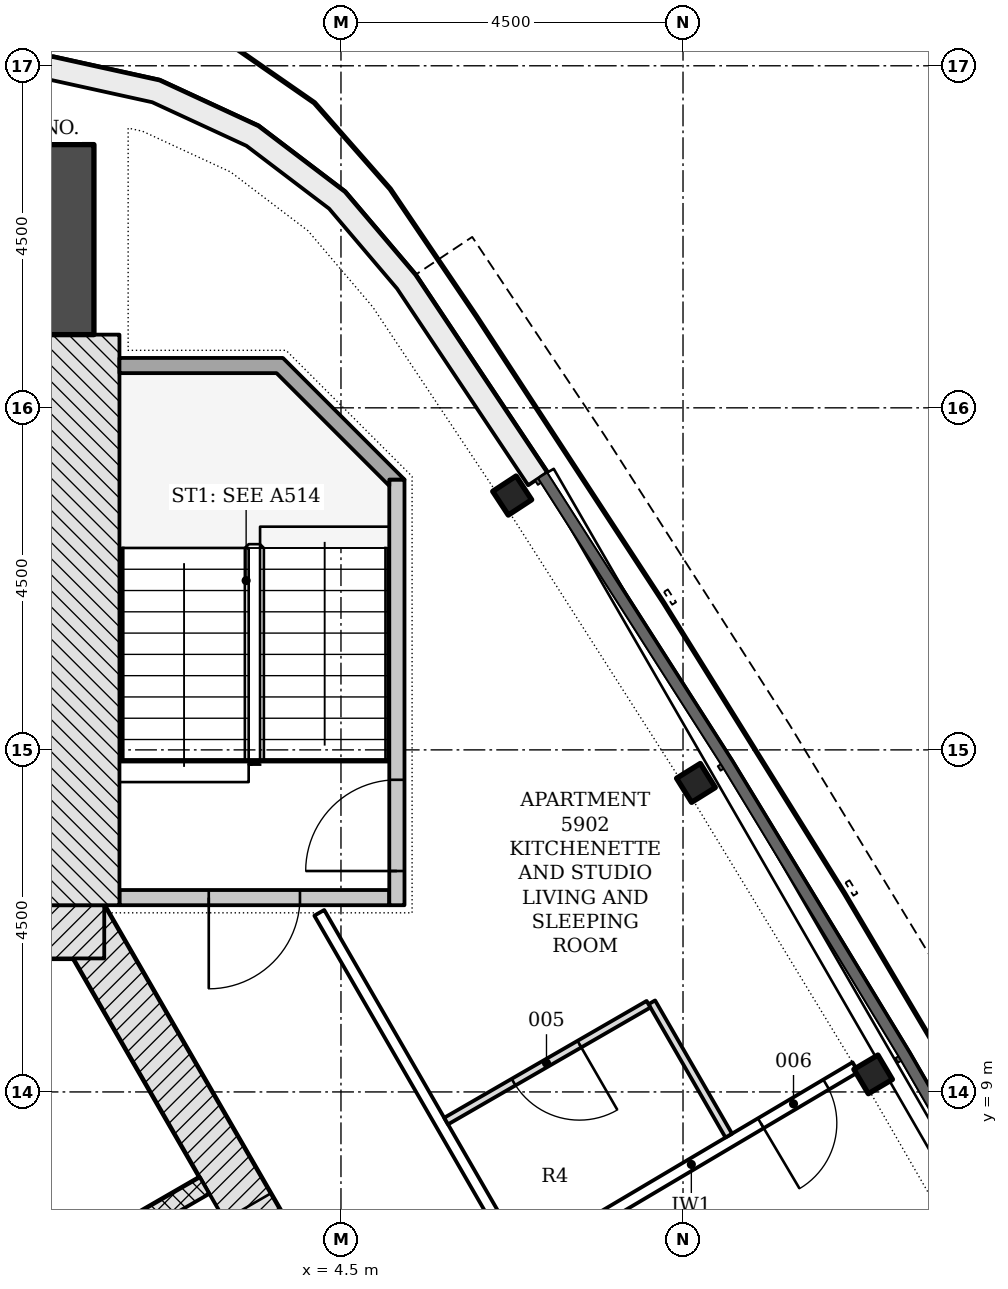
"""IFC4 building model, lengths in metres.
Left out: names, types, materials, properties, quantities, classifications, styles, units other than length and angle.
Written with IfcOpenShell. Run it as: python <this file> out.ifc"""

import sys

from ifc_helpers import new_model, si_unit, direction, frame, frame_2d, origin, origin_2d, place, context, subcontext, project, spatial, polyline, rectangle, i_section, outline, extrude, element, fill, save


model = new_model("IFC4")
c1 = context("Model", 3, precision=1e-05, world=origin(), true_north=direction((0.0, 1.0)))
c2 = subcontext(c1, "Body", "Model", "MODEL_VIEW")
j1 = project(units=[si_unit("LENGTHUNIT", "METRE"), si_unit("PLANEANGLEUNIT", "RADIAN")], contexts=[c1])
p1 = place(None, origin())
s1 = spatial("IfcSite", under=j1, at=p1, CompositionType="ELEMENT")
p2 = place(p1, origin())
s2 = spatial("IfcBuilding", under=s1, at=p2, CompositionType="ELEMENT")
p3 = place(p2, frame((0.0, 0.0, 229.2)))
s3 = spatial("IfcBuildingStorey", under=s2, at=p3, CompositionType="ELEMENT", Elevation=229.2)
p4 = place(p3, frame((10.311, -4.703, -0.2), z_axis=(0.0, 0.0, 1.0), x_axis=(-0.500001446645, 0.866024568562, 0.0)))
e1 = element("IfcWall", 1, at=p4, inside=s3, PredefinedType="SHEAR", context=c2, shape_type="SweptSolid", body=[
    extrude(rectangle(XDim=18.458, YDim=0.7, at=frame_2d((9.229, 0.0))), origin(), (0.0, 0.0, 1.0), 3.6),
])
p5 = place(p4, frame((4.379, 0.0, 0.2)))
e2 = element("IfcOpeningElement", 2, at=p5, cuts=e1, PredefinedType="OPENING", context=c2, shape_type="SweptSolid", body=[
    extrude(rectangle(XDim=1.1, YDim=2.1, at=frame_2d((0.55, 1.05))), frame((0.0, 0.36, 0.0), z_axis=(0.0, -1.0, 0.0), x_axis=(1.0, 0.0, 0.0)), (0.0, 0.0, 1.0), 0.72),
])
p6 = place(p4, frame((6.529, 0.0, 0.2)))
e3 = element("IfcOpeningElement", 3, at=p6, cuts=e1, PredefinedType="OPENING", context=c2, shape_type="SweptSolid", body=[
    extrude(rectangle(XDim=1.1, YDim=2.1, at=frame_2d((0.55, 1.05))), frame((0.0, 0.36, 0.0), z_axis=(0.0, -1.0, 0.0), x_axis=(1.0, 0.0, 0.0)), (0.0, 0.0, 1.0), 0.72),
])
p7 = place(p4, frame((8.679, 0.0, 0.2)))
e4 = element("IfcOpeningElement", 4, at=p7, cuts=e1, PredefinedType="OPENING", context=c2, shape_type="SweptSolid", body=[
    extrude(rectangle(XDim=1.1, YDim=2.1, at=frame_2d((0.55, 1.05))), frame((0.0, 0.36, 0.0), z_axis=(0.0, -1.0, 0.0), x_axis=(1.0, 0.0, 0.0)), (0.0, 0.0, 1.0), 0.72),
])
p8 = place(p4, frame((10.829, 0.0, 0.2)))
e5 = element("IfcOpeningElement", 5, at=p8, cuts=e1, PredefinedType="OPENING", context=c2, shape_type="SweptSolid", body=[
    extrude(rectangle(XDim=1.1, YDim=2.1, at=frame_2d((0.55, 1.05))), frame((0.0, 0.36, 0.0), z_axis=(0.0, -1.0, 0.0), x_axis=(1.0, 0.0, 0.0)), (0.0, 0.0, 1.0), 0.72),
])
p9 = place(p4, frame((12.979, 0.0, 0.2)))
e6 = element("IfcOpeningElement", 6, at=p9, cuts=e1, PredefinedType="OPENING", context=c2, shape_type="SweptSolid", body=[
    extrude(rectangle(XDim=1.1, YDim=2.1, at=frame_2d((0.55, 1.05))), frame((0.0, 0.36, 0.0), z_axis=(0.0, -1.0, 0.0), x_axis=(1.0, 0.0, 0.0)), (0.0, 0.0, 1.0), 0.72),
])
p10 = place(p3, frame((1.386, 11.106, -0.2), z_axis=(0.0, 0.0, 1.0), x_axis=(-1.0, 0.0, 0.0)))
e7 = element("IfcWall", 7, at=p10, inside=s3, PredefinedType="SHEAR", context=c2, shape_type="SweptSolid", body=[
    extrude(rectangle(XDim=2.771, YDim=0.7, at=frame_2d((1.386, 0.0))), origin(), (0.0, 0.0, 1.0), 3.6),
])
p11 = place(p3, frame((0.0, 20.213, -0.2), z_axis=(0.0, 0.0, 1.0), x_axis=(0.0, 1.0, 0.0)))
e8 = element("IfcColumn", 8, at=p11, inside=s3, PredefinedType="COLUMN", context=c2, shape_type="SweptSolid", body=[
    extrude(rectangle(XDim=2.5, YDim=2.5, at=origin_2d()), origin(), (0.0, 0.0, 1.0), 3.6),
])
for number, where, z_axis, x_axis in (
    (9, (11.501, 9.231, -0.2), (0.0, 0.0, 1.0), (-0.51, 0.86, 0.0)),
    (10, (9.17, 13.065, -0.2), (0.0, 0.0, 1.0), (-0.529, 0.849, 0.0)),
    (11, (6.753, 16.846, -0.2), (0.0, 0.0, 1.0), (-0.548, 0.836, 0.0)),
):
    element("IfcColumn", number, at=place(p3, frame(where, z_axis=z_axis, x_axis=x_axis)), inside=s3, PredefinedType="COLUMN", context=c2, shape_type="SweptSolid", body=[
        extrude(i_section(OverallWidth=0.373, OverallDepth=0.368, WebThickness=0.015, FlangeThickness=0.024, FilletRadius=0.015, at=origin_2d()), origin(), (0.0, 0.0, 1.0), 3.6),
    ])
p12 = place(p3, origin())
e12 = element("IfcWall", 12, at=p12, inside=s3, PredefinedType="NOTDEFINED", context=c2, shape_type="SweptSolid", body=[
    extrude(outline(polyline([(7.213, 17.148), (5.478, 19.749), (4.551, 20.84), (3.412, 21.706), (2.113, 22.306), (0.716, 22.614), (-0.716, 22.614), (-2.113, 22.306), (-3.412, 21.706), (-4.551, 20.84), (-5.478, 19.749), (-7.213, 17.148), (-6.963, 16.981), (-5.238, 19.568), (-4.344, 20.621), (-3.256, 21.447), (-2.017, 22.021), (-0.683, 22.314), (0.683, 22.314), (2.017, 22.021), (3.256, 21.447), (4.344, 20.621), (5.238, 19.568), (6.963, 16.981), (7.213, 17.148)])), origin(), (0.0, 0.0, 1.0), 3.3),
])
p13 = place(p3, frame((2.706, 7.769, -0.2), z_axis=(0.0, 0.0, 1.0), x_axis=(-0.866022959057, -0.500004234368, 0.0)))
e13 = element("IfcWall", 13, at=p13, inside=s3, PredefinedType="PARTITIONING", context=c2, shape_type="SweptSolid", body=[
    extrude(rectangle(XDim=2.5, YDim=0.25, at=frame_2d((1.25, 0.0))), origin(), (0.0, 0.0, 1.0), 3.6),
])
p14 = place(p3, frame((5.135, 11.556, -0.2), z_axis=(0.0, 0.0, 1.0), x_axis=(-1.0, 0.0, 0.0)))
e14 = element("IfcWall", 14, at=p14, inside=s3, PredefinedType="SHEAR", context=c2, shape_type="SweptSolid", body=[
    extrude(rectangle(XDim=3.55, YDim=0.2, at=frame_2d((1.775, 0.0))), origin(), (0.0, 0.0, 1.0), 3.6),
])
p15 = place(p14, frame((1.175, 0.0, 0.2)))
e15 = element("IfcOpeningElement", 15, at=p15, cuts=e14, PredefinedType="OPENING", context=c2, shape_type="SweptSolid", body=[
    extrude(rectangle(XDim=1.2, YDim=2.1, at=frame_2d((0.6, 1.05))), frame((0.0, 0.11, 0.0), z_axis=(0.0, -1.0, 0.0), x_axis=(1.0, 0.0, 0.0)), (0.0, 0.0, 1.0), 0.22),
])
p16 = place(p3, frame((5.236, 11.456, -0.2), z_axis=(0.0, 0.0, 1.0), x_axis=(0.0, 1.0, 0.0)))
e16 = element("IfcWall", 16, at=p16, inside=s3, PredefinedType="SHEAR", context=c2, shape_type="SweptSolid", body=[
    extrude(rectangle(XDim=5.6, YDim=0.2, at=frame_2d((2.8, 0.0))), origin(), (0.0, 0.0, 1.0), 3.6),
])
p17 = place(p16, frame((0.45, 0.0, 0.2)))
e17 = element("IfcOpeningElement", 17, at=p17, cuts=e16, PredefinedType="OPENING", context=c2, shape_type="SweptSolid", body=[
    extrude(rectangle(XDim=1.2, YDim=2.1, at=frame_2d((0.6, 1.05))), frame((0.0, 0.11, 0.0), z_axis=(0.0, -1.0, 0.0), x_axis=(1.0, 0.0, 0.0)), (0.0, 0.0, 1.0), 0.22),
])
p18 = place(p3, frame((0.955, 11.456, -0.2), z_axis=(0.0, 0.0, 1.0), x_axis=(0.0, 1.0, 0.0)))
e18 = element("IfcWall", 18, at=p18, inside=s3, PredefinedType="SHEAR", context=c2, shape_type="SweptSolid", body=[
    extrude(rectangle(XDim=7.507, YDim=1.261, at=frame_2d((3.753, 0.0))), origin(), (0.0, 0.0, 1.0), 3.6),
])
p19 = place(p3, frame((0.0, 0.0, -0.2)))
e19 = element("IfcWall", 19, at=p19, inside=s3, PredefinedType="SHEAR", context=c2, shape_type="SweptSolid", body=[
    extrude(outline(polyline([(5.336, 17.056), (3.736, 18.656), (1.586, 18.656), (1.586, 18.456), (3.653, 18.456), (5.135, 16.974), (5.135, 17.056), (5.135, 17.056), (5.135, 17.056), (5.135, 17.056), (5.135, 17.056), (5.135, 17.056), (5.135, 17.056), (5.135, 17.056), (5.135, 17.056), (5.135, 17.056), (5.135, 17.056), (5.135, 17.056), (5.135, 17.056), (5.135, 17.056), (5.135, 17.056), (5.135, 17.056), (5.135, 17.056), (5.336, 17.056)])), origin(), (0.0, 0.0, 1.0), 3.6),
])
p20 = place(p3, frame((6.886, 6.729, 0.0), z_axis=(0.0, 0.0, 1.0), x_axis=(-0.4999966759, 0.866027322946, 0.0)))
e20 = element("IfcWall", 20, at=p20, inside=s3, PredefinedType="PARTITIONING", context=c2, shape_type="SweptSolid", body=[
    extrude(rectangle(XDim=5.343, YDim=0.15, at=frame_2d((2.672, 0.0))), origin(), (0.0, 0.0, 1.0), 2.852),
])
p21 = place(p3, frame((11.268, 9.325, 0.0), z_axis=(0.0, 0.0, 1.0), x_axis=(-0.860287582295, -0.509809058128, 0.0)))
e21 = element("IfcWall", 21, at=p21, inside=s3, PredefinedType="PARTITIONING", context=c2, shape_type="SweptSolid", body=[
    extrude(rectangle(XDim=5.018, YDim=0.15, at=frame_2d((2.509, 0.0))), origin(), (0.0, 0.0, 1.0), 3.4),
])
p22 = place(p21, frame((0.447, 0.0, 0.0)))
e22 = element("IfcOpeningElement", 22, at=p22, cuts=e21, PredefinedType="OPENING", context=c2, shape_type="SweptSolid", body=[
    extrude(rectangle(XDim=1.0, YDim=2.1, at=frame_2d((0.5, 1.05))), frame((0.0, 0.085, 0.0), z_axis=(0.0, -1.0, 0.0), x_axis=(1.0, 0.0, 0.0)), (0.0, 0.0, 1.0), 0.17),
])
p23 = place(p3, frame((9.602, 8.425, 0.0), z_axis=(0.0, 0.0, 1.0), x_axis=(-0.500080744026, 0.86597878118, 0.0)))
e23 = element("IfcWall", 23, at=p23, inside=s3, PredefinedType="PARTITIONING", context=c2, shape_type="SweptSolid", body=[
    extrude(rectangle(XDim=2.025, YDim=0.1, at=frame_2d((1.013, 0.0))), origin(), (0.0, 0.0, 1.0), 3.4),
])
p24 = place(p3, frame((8.546, 10.154, 0.0), z_axis=(0.0, 0.0, 1.0), x_axis=(-0.866016353143, -0.500015675843, 0.0)))
e24 = element("IfcWall", 24, at=p24, inside=s3, PredefinedType="PARTITIONING", context=c2, shape_type="SweptSolid", body=[
    extrude(rectangle(XDim=3.075, YDim=0.1, at=frame_2d((1.538, 0.0))), origin(), (0.0, 0.0, 1.0), 3.4),
])
p25 = place(p24, frame((1.05, 0.0, 0.0)))
e25 = element("IfcOpeningElement", 25, at=p25, cuts=e24, PredefinedType="OPENING", context=c2, shape_type="SweptSolid", body=[
    extrude(rectangle(XDim=1.0, YDim=2.1, at=frame_2d((0.5, 1.05))), frame((0.0, 0.06, 0.0), z_axis=(0.0, -1.0, 0.0), x_axis=(1.0, 0.0, 0.0)), (0.0, 0.0, 1.0), 0.12),
])
p26 = place(p9, origin())
e26 = element("IfcDoor", 26, at=p26, inside=s3, OperationType="DOUBLE_DOOR_SLIDING", PredefinedType="DOOR", context=c2, shape_type="SweptSolid", body=[
    extrude(rectangle(XDim=1.1, YDim=2.1, at=frame_2d((0.55, 1.05))), frame((0.0, 0.025, 0.0), z_axis=(0.0, -1.0, 0.0), x_axis=(1.0, 0.0, 0.0)), (0.0, 0.0, 1.0), 0.05),
])
fill(e6, e26)
p27 = place(p15, origin())
e27 = element("IfcDoor", 27, at=p27, inside=s3, OperationType="SINGLE_SWING_RIGHT", PredefinedType="DOOR", context=c2, shape_type="SweptSolid", body=[
    extrude(rectangle(XDim=1.2, YDim=2.1, at=frame_2d((0.6, 1.05))), frame((0.0, 0.025, 0.0), z_axis=(0.0, -1.0, 0.0), x_axis=(1.0, 0.0, 0.0)), (0.0, 0.0, 1.0), 0.05),
])
fill(e15, e27)
p28 = place(p17, origin())
e28 = element("IfcDoor", 28, at=p28, inside=s3, OperationType="SINGLE_SWING_LEFT", PredefinedType="DOOR", context=c2, shape_type="SweptSolid", body=[
    extrude(rectangle(XDim=1.2, YDim=2.1, at=frame_2d((0.6, 1.05))), frame((0.0, 0.025, 0.0), z_axis=(0.0, -1.0, 0.0), x_axis=(1.0, 0.0, 0.0)), (0.0, 0.0, 1.0), 0.05),
])
fill(e17, e28)
p29 = place(p25, origin())
e29 = element("IfcDoor", 29, at=p29, inside=s3, OperationType="SINGLE_SWING_LEFT", PredefinedType="DOOR", context=c2, shape_type="SweptSolid", body=[
    extrude(rectangle(XDim=1.0, YDim=2.1, at=frame_2d((0.5, 1.05))), frame((0.0, 0.025, 0.0), z_axis=(0.0, -1.0, 0.0), x_axis=(1.0, 0.0, 0.0)), (0.0, 0.0, 1.0), 0.05),
])
fill(e25, e29)
p30 = place(p22, origin())
e30 = element("IfcDoor", 30, at=p30, inside=s3, OperationType="SINGLE_SWING_RIGHT", PredefinedType="DOOR", context=c2, shape_type="SweptSolid", body=[
    extrude(rectangle(XDim=1.0, YDim=2.1, at=frame_2d((0.5, 1.05))), frame((0.0, 0.025, 0.0), z_axis=(0.0, -1.0, 0.0), x_axis=(1.0, 0.0, 0.0)), (0.0, 0.0, 1.0), 0.05),
])
fill(e22, e30)
save(model, sys.argv[1])
